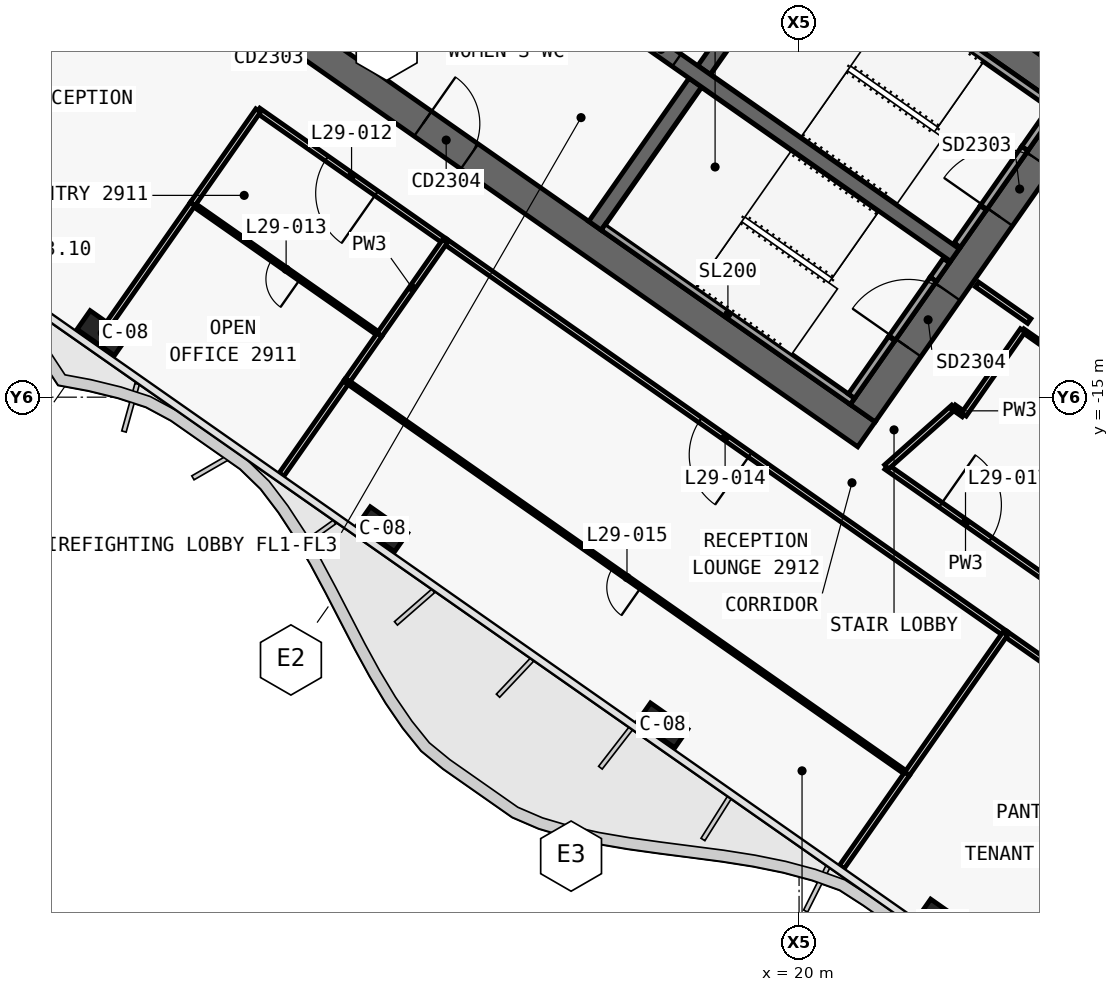
"""IFC4 building model, lengths in metres.
Left out: names, types, materials, properties, quantities, classifications, styles, units other than length and angle.
Written with IfcOpenShell. Run it as: python <this file> out.ifc"""

import sys

from ifc_helpers import new_model, si_unit, direction, frame, frame_2d, origin, origin_2d, place, context, subcontext, project, spatial, polyline, rectangle, outline, extrude, element, fill, save


model = new_model("IFC4")
c1 = context("Model", 3, precision=1e-05, world=origin(), true_north=direction((0.0, 1.0)))
c2 = subcontext(c1, "Body", "Model", "MODEL_VIEW")
j1 = project(units=[si_unit("LENGTHUNIT", "METRE"), si_unit("PLANEANGLEUNIT", "RADIAN")], contexts=[c1])
p1 = place(None, origin())
s1 = spatial("IfcSite", under=j1, at=p1, CompositionType="ELEMENT")
p2 = place(p1, origin())
s2 = spatial("IfcBuilding", under=s1, at=p2, CompositionType="ELEMENT")
p3 = place(p2, frame((0.0, 0.0, 132.0)))
s3 = spatial("IfcBuildingStorey", under=s2, at=p3, CompositionType="ELEMENT", Elevation=132.0)
p4 = place(p3, frame((-0.029, 11.984, 0.0), z_axis=(0.0, 0.0, 1.0), x_axis=(0.819151382952, -0.573577380837, 0.0)))
e1 = element("IfcWall", 1, at=p4, inside=s3, PredefinedType="SHEAR", context=c2, shape_type="SweptSolid", body=[
    extrude(outline(polyline([(33.898, 0.4), (-0.0, 0.4), (0.56, -0.4), (33.898, -0.4), (33.898, 0.4)])), origin(), (0.0, 0.0, 1.0), 3.9),
])
p5 = place(p3, frame((-0.029, -0.712, 0.0), z_axis=(0.0, 0.0, 1.0), x_axis=(0.819151758019, -0.573576845187, 0.0)))
e2 = element("IfcWall", 2, at=p5, inside=s3, PredefinedType="SHEAR", context=c2, shape_type="SweptSolid", body=[
    extrude(outline(polyline([(26.616, 0.4), (-0.0, 0.4), (0.56, -0.4), (26.616, -0.4), (26.616, 0.4)])), origin(), (0.0, 0.0, 1.0), 3.9),
])
p6 = place(p5, frame((6.666, 0.0, 0.0)))
e3 = element("IfcOpeningElement", 3, at=p6, cuts=e2, PredefinedType="OPENING", context=c2, shape_type="SweptSolid", body=[
    extrude(rectangle(XDim=1.5, YDim=2.1, at=frame_2d((0.75, 1.05))), frame((0.0, 0.41, 0.0), z_axis=(0.0, -1.0, 0.0), x_axis=(1.0, 0.0, 0.0)), (0.0, 0.0, 1.0), 0.82),
])
p7 = place(p5, frame((12.366, 0.0, 0.0)))
e4 = element("IfcOpeningElement", 4, at=p7, cuts=e2, PredefinedType="OPENING", context=c2, shape_type="SweptSolid", body=[
    extrude(rectangle(XDim=1.5, YDim=2.1, at=frame_2d((0.75, 1.05))), frame((0.0, 0.41, 0.0), z_axis=(0.0, -1.0, 0.0), x_axis=(1.0, 0.0, 0.0)), (0.0, 0.0, 1.0), 0.82),
])
p8 = place(p3, frame((21.675, -15.421, 0.0), z_axis=(0.0, 0.0, 1.0), x_axis=(0.573581815061, 0.819148278049, 0.0)))
e5 = element("IfcWall", 5, at=p8, inside=s3, PredefinedType="SHEAR", context=c2, shape_type="SweptSolid", body=[
    extrude(outline(polyline([(9.6, 0.4), (0.0, 0.4), (0.0, -0.4), (9.6, -0.4), (9.6, 0.4)])), origin(), (0.0, 0.0, 1.0), 3.9),
])
p9 = place(p8, frame((6.3, 0.0, 0.0)))
e6 = element("IfcOpeningElement", 6, at=p9, cuts=e5, PredefinedType="OPENING", context=c2, shape_type="SweptSolid", body=[
    extrude(rectangle(XDim=1.8, YDim=2.1, at=frame_2d((0.9, 1.05))), frame((0.0, 0.41, 0.0), z_axis=(0.0, -1.0, 0.0), x_axis=(1.0, 0.0, 0.0)), (0.0, 0.0, 1.0), 0.82),
])
p10 = place(p8, frame((2.1, 0.0, 0.0)))
e7 = element("IfcOpeningElement", 7, at=p10, cuts=e5, PredefinedType="OPENING", context=c2, shape_type="SweptSolid", body=[
    extrude(rectangle(XDim=1.8, YDim=2.1, at=frame_2d((0.9, 1.05))), frame((0.0, 0.41, 0.0), z_axis=(0.0, -1.0, 0.0), x_axis=(1.0, 0.0, 0.0)), (0.0, 0.0, 1.0), 0.82),
])
p11 = place(p3, frame((14.63, -10.488, 0.0), z_axis=(0.0, 0.0, 1.0), x_axis=(0.573611936273, 0.819127185829, 0.0)))
e8 = element("IfcWall", 8, at=p11, inside=s3, PredefinedType="SHEAR", context=c2, shape_type="SweptSolid", body=[
    extrude(outline(polyline([(0.0, 0.2), (0.0, -0.2), (4.6, -0.2), (4.6, 0.2), (0.0, 0.2)])), origin(), (0.0, 0.0, 1.0), 3.9),
])
p12 = place(p3, frame((17.498, -6.392, 0.0), z_axis=(0.0, 0.0, 1.0), x_axis=(0.573611936273, 0.819127185829, 0.0)))
e9 = element("IfcWall", 9, at=p12, inside=s3, PredefinedType="SHEAR", context=c2, shape_type="SweptSolid", body=[
    extrude(outline(polyline([(4.6, -0.2), (4.6, 0.2), (0.0, 0.2), (0.0, -0.2), (4.6, -0.2)])), origin(), (0.0, 0.0, 1.0), 3.9),
])
p13 = place(p3, frame((2.638, 3.768, 0.0), z_axis=(0.0, 0.0, 1.0), x_axis=(0.81915267502, -0.573575535572, 0.0)))
e10 = element("IfcWall", 10, at=p13, inside=s3, PredefinedType="SHEAR", context=c2, shape_type="SweptSolid", body=[
    extrude(outline(polyline([(0.0, 0.2), (0.0, -0.2), (26.2, -0.2), (26.2, 0.2), (0.0, 0.2)])), origin(), (0.0, 0.0, 1.0), 3.9),
])
p14 = place(p13, frame((9.637, 0.0, 0.0)))
e11 = element("IfcOpeningElement", 11, at=p14, cuts=e10, PredefinedType="OPENING", context=c2, shape_type="SweptSolid", body=[
    extrude(rectangle(XDim=1.2, YDim=2.1, at=frame_2d((0.6, 1.05))), frame((0.0, 0.21, 0.0), z_axis=(0.0, -1.0, 0.0), x_axis=(1.0, 0.0, 0.0)), (0.0, 0.0, 1.0), 0.42),
])
p15 = place(p13, frame((11.812, 0.0, 0.0)))
e12 = element("IfcOpeningElement", 12, at=p15, cuts=e10, PredefinedType="OPENING", context=c2, shape_type="SweptSolid", body=[
    extrude(rectangle(XDim=1.2, YDim=2.1, at=frame_2d((0.6, 1.05))), frame((0.0, 0.21, 0.0), z_axis=(0.0, -1.0, 0.0), x_axis=(1.0, 0.0, 0.0)), (0.0, 0.0, 1.0), 0.42),
])
p16 = place(p13, frame((13.988, 0.0, 0.0)))
e13 = element("IfcOpeningElement", 13, at=p16, cuts=e10, PredefinedType="OPENING", context=c2, shape_type="SweptSolid", body=[
    extrude(rectangle(XDim=1.2, YDim=2.1, at=frame_2d((0.6, 1.05))), frame((0.0, 0.21, 0.0), z_axis=(0.0, -1.0, 0.0), x_axis=(1.0, 0.0, 0.0)), (0.0, 0.0, 1.0), 0.42),
])
p17 = place(p13, frame((16.262, 0.0, 0.0)))
e14 = element("IfcOpeningElement", 14, at=p17, cuts=e10, PredefinedType="OPENING", context=c2, shape_type="SweptSolid", body=[
    extrude(rectangle(XDim=1.0, YDim=2.1, at=frame_2d((0.5, 1.05))), frame((0.0, 0.21, 0.0), z_axis=(0.0, -1.0, 0.0), x_axis=(1.0, 0.0, 0.0)), (0.0, 0.0, 1.0), 0.42),
])
for number, where, z_axis, x_axis in (
    (15, (1.665, -13.313, 0.0), (0.0, 0.0, 1.0), (0.819, -0.574, 0.0)),
    (16, (9.038, -18.475, 0.0), (0.0, 0.0, 1.0), (0.819, -0.574, 0.0)),
    (17, (16.41, -23.637, 0.0), (0.0, 0.0, 1.0), (0.819, -0.574, 0.0)),
    (18, (23.782, -28.799, 0.0), (0.0, 0.0, 1.0), (0.819, -0.574, 0.0)),
):
    element("IfcColumn", number, at=place(p3, frame(where, z_axis=z_axis, x_axis=x_axis)), inside=s3, PredefinedType="COLUMN", context=c2, shape_type="SweptSolid", body=[
        extrude(rectangle(XDim=1.2, YDim=0.6, at=origin_2d()), origin(), (0.0, 0.0, 1.0), 3.9),
    ])
p18 = place(p3, frame((20.243, -2.821, 0.0), z_axis=(0.0, 0.0, 1.0), x_axis=(0.819141584393, -0.57359137434, 0.0)))
e19 = element("IfcWall", 19, at=p18, inside=s3, PredefinedType="SOLIDWALL", context=c2, shape_type="SweptSolid", body=[
    extrude(rectangle(XDim=8.0, YDim=0.2, at=frame_2d((4.0, 0.0))), origin(), (0.0, 0.0, 1.0), 3.62),
])
p19 = place(p3, frame((24.162, -10.998, 0.0), z_axis=(0.0, 0.0, 1.0), x_axis=(0.573612502218, 0.819126789514, 0.0)))
e20 = element("IfcWall", 20, at=p19, inside=s3, PredefinedType="SOLIDWALL", context=c2, shape_type="SweptSolid", body=[
    extrude(rectangle(XDim=1.2, YDim=0.2, at=frame_2d((0.6, 0.0))), origin(), (0.0, 0.0, 1.0), 3.62),
])
p20 = place(p3, frame((25.94, -8.458, 0.0), z_axis=(0.0, 0.0, 1.0), x_axis=(0.573619628835, 0.819121798889, 0.0)))
e21 = element("IfcWall", 21, at=p20, inside=s3, PredefinedType="SOLIDWALL", context=c2, shape_type="SweptSolid", body=[
    extrude(rectangle(XDim=1.25, YDim=0.2, at=frame_2d((0.625, 0.0))), origin(), (0.0, 0.0, 1.0), 3.62),
])
p21 = place(p3, frame((24.85, -10.014, 2.15), z_axis=(0.0, 0.0, 1.0), x_axis=(0.573505465124, 0.819201734296, 0.0)))
e22 = element("IfcWall", 22, at=p21, inside=s3, PredefinedType="SOLIDWALL", context=c2, shape_type="SweptSolid", body=[
    extrude(rectangle(XDim=1.9, YDim=0.2, at=frame_2d((0.95, 0.0))), origin(), (0.0, 0.0, 1.0), 1.47),
])
p22 = place(p3, frame((14.851, -10.521, 0.0), z_axis=(0.0, 0.0, 1.0), x_axis=(0.819141584393, -0.57359137434, 0.0)))
e23 = element("IfcWall", 23, at=p22, inside=s3, PredefinedType="SOLIDWALL", context=c2, shape_type="SweptSolid", body=[
    extrude(rectangle(XDim=8.0, YDim=0.2, at=frame_2d((4.0, 0.0))), origin(), (0.0, 0.0, 1.0), 3.62),
])
p23 = place(p3, frame((21.38, -14.97, 0.0), z_axis=(0.0, 0.0, 1.0), x_axis=(0.573559770908, 0.819163713305, 0.0)))
e24 = element("IfcWall", 24, at=p23, inside=s3, PredefinedType="SOLIDWALL", context=c2, shape_type="SweptSolid", body=[
    extrude(rectangle(XDim=1.85, YDim=0.2, at=frame_2d((0.925, 0.0))), origin(), (0.0, 0.0, 1.0), 3.62),
])
p24 = place(p3, frame((23.531, -11.898, 0.0), z_axis=(0.0, 0.0, 1.0), x_axis=(0.573708088123, 0.819059844958, 0.0)))
e25 = element("IfcWall", 25, at=p24, inside=s3, PredefinedType="SOLIDWALL", context=c2, shape_type="SweptSolid", body=[
    extrude(rectangle(XDim=0.6, YDim=0.2, at=frame_2d((0.3, 0.0))), origin(), (0.0, 0.0, 1.0), 3.62),
])
p25 = place(p3, frame((22.441, -13.455, 2.15), z_axis=(0.0, 0.0, 1.0), x_axis=(0.573591692345, 0.819141361715, 0.0)))
e26 = element("IfcWall", 26, at=p25, inside=s3, PredefinedType="SOLIDWALL", context=c2, shape_type="SweptSolid", body=[
    extrude(rectangle(XDim=1.9, YDim=0.2, at=frame_2d((0.95, 0.0))), origin(), (0.0, 0.0, 1.0), 1.47),
])
p26 = place(p3, frame((22.3, -16.835, 0.0), z_axis=(0.0, 0.0, 1.0), x_axis=(0.819173202411, -0.573546218235, 0.0)))
e27 = element("IfcWall", 27, at=p26, inside=s3, PredefinedType="PARTITIONING", context=c2, shape_type="SweptSolid", body=[
    extrude(rectangle(XDim=5.079, YDim=0.15, at=frame_2d((2.54, 0.0))), origin(), (0.0, 0.0, 1.0), 3.0),
])
p27 = place(p26, frame((1.74, 0.0, 0.0)))
e28 = element("IfcOpeningElement", 28, at=p27, cuts=e27, PredefinedType="OPENING", context=c2, shape_type="SweptSolid", body=[
    extrude(rectangle(XDim=1.6, YDim=2.1, at=frame_2d((0.8, 1.05))), frame((0.0, 0.085, 0.0), z_axis=(0.0, -1.0, 0.0), x_axis=(1.0, 0.0, 0.0)), (0.0, 0.0, 1.0), 0.17),
])
p28 = place(p3, frame((10.683, -10.898, 0.0), z_axis=(0.0, 0.0, 1.0), x_axis=(-0.819180321071, 0.573536050802, 0.0)))
e29 = element("IfcWall", 29, at=p28, inside=s3, PredefinedType="PARTITIONING", context=c2, shape_type="SweptSolid", body=[
    extrude(rectangle(XDim=6.002, YDim=0.15, at=frame_2d((3.001, 0.0))), origin(), (0.0, 0.0, 1.0), 3.0),
])
p29 = place(p28, frame((2.201, 0.0, 0.0)))
e30 = element("IfcOpeningElement", 30, at=p29, cuts=e29, PredefinedType="OPENING", context=c2, shape_type="SweptSolid", body=[
    extrude(rectangle(XDim=1.6, YDim=2.1, at=frame_2d((0.8, 1.05))), frame((0.0, 0.085, 0.0), z_axis=(0.0, -1.0, 0.0), x_axis=(1.0, 0.0, 0.0)), (0.0, 0.0, 1.0), 0.17),
])
p30 = place(p3, frame((25.428, -21.222, 0.0), z_axis=(0.0, 0.0, 1.0), x_axis=(-0.819170120389, 0.573550620139, 0.0)))
e31 = element("IfcWall", 31, at=p30, inside=s3, PredefinedType="PARTITIONING", context=c2, shape_type="SweptSolid", body=[
    extrude(rectangle(XDim=18.004, YDim=0.15, at=frame_2d((9.002, 0.0))), origin(), (0.0, 0.0, 1.0), 3.0),
])
p31 = place(p30, frame((8.202, 0.0, 0.0)))
e32 = element("IfcOpeningElement", 32, at=p31, cuts=e31, PredefinedType="OPENING", context=c2, shape_type="SweptSolid", body=[
    extrude(rectangle(XDim=1.6, YDim=2.1, at=frame_2d((0.8, 1.05))), frame((0.0, 0.085, 0.0), z_axis=(0.0, -1.0, 0.0), x_axis=(1.0, 0.0, 0.0)), (0.0, 0.0, 1.0), 0.17),
])
p32 = place(p3, frame((35.256, -28.104, 0.0), z_axis=(0.0, 0.0, 1.0), x_axis=(-0.819174576401, 0.573544255814, 0.0)))
e33 = element("IfcWall", 33, at=p32, inside=s3, PredefinedType="PARTITIONING", context=c2, shape_type="SweptSolid", body=[
    extrude(rectangle(XDim=12.002, YDim=0.15, at=frame_2d((6.001, 0.0))), origin(), (0.0, 0.0, 1.0), 2.9),
])
p33 = place(p32, frame((5.201, 0.0, 0.0)))
e34 = element("IfcOpeningElement", 34, at=p33, cuts=e33, PredefinedType="OPENING", context=c2, shape_type="SweptSolid", body=[
    extrude(rectangle(XDim=1.6, YDim=2.1, at=frame_2d((0.8, 1.05))), frame((0.0, 0.085, 0.0), z_axis=(0.0, -1.0, 0.0), x_axis=(1.0, 0.0, 0.0)), (0.0, 0.0, 1.0), 0.17),
])
p34 = place(p3, frame((25.886, -13.242, 0.0), z_axis=(0.0, 0.0, 1.0), x_axis=(0.819160910421, -0.573563773994, 0.0)))
e35 = element("IfcWall", 35, at=p34, inside=s3, PredefinedType="PARTITIONING", context=c2, shape_type="SweptSolid", body=[
    extrude(rectangle(XDim=4.2, YDim=0.1, at=frame_2d((2.1, 0.0))), origin(), (0.0, 0.0, 1.0), 3.62),
])
p35 = place(p34, frame((1.65, 0.0, 0.0)))
e36 = element("IfcOpeningElement", 36, at=p35, cuts=e35, PredefinedType="OPENING", context=c2, shape_type="SweptSolid", body=[
    extrude(rectangle(XDim=0.9, YDim=2.1, at=frame_2d((0.45, 1.05))), frame((0.0, 0.06, 0.0), z_axis=(0.0, -1.0, 0.0), x_axis=(1.0, 0.0, 0.0)), (0.0, 0.0, 1.0), 0.12),
])
p36 = place(p3, frame((26.058, -12.997, 0.0), z_axis=(0.0, 0.0, 1.0), x_axis=(-0.819109000826, 0.573637903879, 0.0)))
e37 = element("IfcWall", 37, at=p36, inside=s3, PredefinedType="PARTITIONING", context=c2, shape_type="SweptSolid", body=[
    extrude(rectangle(XDim=1.68, YDim=0.15, at=frame_2d((0.84, 0.0))), origin(), (0.0, 0.0, 1.0), 3.62),
])
p37 = place(p3, frame((22.301, -16.836, 0.0), z_axis=(0.0, 0.0, 1.0), x_axis=(0.746924703007, 0.664908631345, 0.0)))
e38 = element("IfcWall", 38, at=p37, inside=s3, PredefinedType="PARTITIONING", context=c2, shape_type="SweptSolid", body=[
    extrude(rectangle(XDim=2.364, YDim=0.15, at=frame_2d((1.182, 0.0))), origin(), (0.0, 0.0, 1.0), 3.0),
])
p38 = place(p3, frame((24.067, -15.265, 0.0), z_axis=(0.0, 0.0, 1.0), x_axis=(0.819092976344, -0.573660784876, 0.0)))
e39 = element("IfcWall", 39, at=p38, inside=s3, PredefinedType="PARTITIONING", context=c2, shape_type="SweptSolid", body=[
    extrude(rectangle(XDim=0.33, YDim=0.15, at=frame_2d((0.165, 0.0))), origin(), (0.0, 0.0, 1.0), 3.62),
])
p39 = place(p3, frame((24.337, -15.454, 0.0), z_axis=(0.0, 0.0, 1.0), x_axis=(0.573626181702, 0.819117209968, 0.0)))
e40 = element("IfcWall", 40, at=p39, inside=s3, PredefinedType="PARTITIONING", context=c2, shape_type="SweptSolid", body=[
    extrude(rectangle(XDim=2.7, YDim=0.15, at=frame_2d((1.35, 0.0))), origin(), (0.0, 0.0, 1.0), 3.62),
])
p40 = place(p3, frame((8.96, -13.355, 0.0), z_axis=(0.0, 0.0, 1.0), x_axis=(-0.819149710902, 0.573579768758, 0.0)))
e41 = element("IfcWall", 41, at=p40, inside=s3, PredefinedType="PARTITIONING", context=c2, shape_type="SweptSolid", body=[
    extrude(rectangle(XDim=6.0, YDim=0.1, at=frame_2d((3.0, 0.0))), origin(), (0.0, 0.0, 1.0), 3.0),
])
p41 = place(p40, frame((2.55, 0.0, 0.0)))
e42 = element("IfcOpeningElement", 42, at=p41, cuts=e41, PredefinedType="OPENING", context=c2, shape_type="SweptSolid", body=[
    extrude(rectangle(XDim=0.9, YDim=2.1, at=frame_2d((0.45, 1.05))), frame((0.0, 0.06, 0.0), z_axis=(0.0, -1.0, 0.0), x_axis=(1.0, 0.0, 0.0)), (0.0, 0.0, 1.0), 0.12),
])
p42 = place(p3, frame((8.101, -14.583, 0.0), z_axis=(0.0, 0.0, 1.0), x_axis=(-0.573516940352, -0.819193700616, 0.0)))
e43 = element("IfcWall", 43, at=p42, inside=s3, PredefinedType="PARTITIONING", context=c2, shape_type="SweptSolid", body=[
    extrude(rectangle(XDim=3.001, YDim=0.15, at=frame_2d((1.5, 0.0))), origin(), (0.0, 0.0, 1.0), 2.9),
])
p43 = place(p3, frame((8.96, -13.355, 0.0), z_axis=(0.0, 0.0, 1.0), x_axis=(-0.573473259837, -0.819224279579, 0.0)))
e44 = element("IfcWall", 44, at=p43, inside=s3, PredefinedType="PARTITIONING", context=c2, shape_type="SweptSolid", body=[
    extrude(rectangle(XDim=1.501, YDim=0.15, at=frame_2d((0.75, 0.0))), origin(), (0.0, 0.0, 1.0), 3.62),
])
p44 = place(p3, frame((1.849, -13.051, 0.0), z_axis=(0.0, 0.0, 1.0), x_axis=(0.573594994199, 0.819139049631, 0.0)))
e45 = element("IfcWall", 45, at=p44, inside=s3, PredefinedType="PARTITIONING", context=c2, shape_type="SweptSolid", body=[
    extrude(rectangle(XDim=3.829, YDim=0.15, at=frame_2d((1.915, 0.0))), origin(), (0.0, 0.0, 1.0), 3.0),
])
p45 = place(p3, frame((10.681, -10.897, 0.0), z_axis=(0.0, 0.0, 1.0), x_axis=(-0.573615254604, -0.819124862085, 0.0)))
e46 = element("IfcWall", 46, at=p45, inside=s3, PredefinedType="PARTITIONING", context=c2, shape_type="SweptSolid", body=[
    extrude(rectangle(XDim=3.0, YDim=0.15, at=frame_2d((1.5, 0.0))), origin(), (0.0, 0.0, 1.0), 3.62),
])
p46 = place(p3, frame((4.046, -9.913, 0.0), z_axis=(0.0, 0.0, 1.0), x_axis=(0.573560650686, 0.819163097304, 0.0)))
e47 = element("IfcWall", 47, at=p46, inside=s3, PredefinedType="PARTITIONING", context=c2, shape_type="SweptSolid", body=[
    extrude(rectangle(XDim=3.0, YDim=0.15, at=frame_2d((1.5, 0.0))), origin(), (0.0, 0.0, 1.0), 3.0),
])
p47 = place(p3, frame((22.844, -24.909, 0.0), z_axis=(0.0, 0.0, 1.0), x_axis=(-0.81914780044, 0.573582497149, 0.0)))
e48 = element("IfcWall", 48, at=p47, inside=s3, PredefinedType="PARTITIONING", context=c2, shape_type="SweptSolid", body=[
    extrude(rectangle(XDim=18.0, YDim=0.1, at=frame_2d((9.0, 0.0))), origin(), (0.0, 0.0, 1.0), 3.0),
])
p48 = place(p47, frame((8.55, 0.0, 0.0)))
e49 = element("IfcOpeningElement", 49, at=p48, cuts=e48, PredefinedType="OPENING", context=c2, shape_type="SweptSolid", body=[
    extrude(rectangle(XDim=0.9, YDim=2.1, at=frame_2d((0.45, 1.05))), frame((0.0, 0.06, 0.0), z_axis=(0.0, -1.0, 0.0), x_axis=(1.0, 0.0, 0.0)), (0.0, 0.0, 1.0), 0.12),
])
p49 = place(p3, frame((22.844, -24.909, 0.0), z_axis=(0.0, 0.0, 1.0), x_axis=(-0.573549763719, -0.81917072002, 0.0)))
e50 = element("IfcWall", 50, at=p49, inside=s3, PredefinedType="PARTITIONING", context=c2, shape_type="SweptSolid", body=[
    extrude(rectangle(XDim=2.999, YDim=0.15, at=frame_2d((1.5, 0.0))), origin(), (0.0, 0.0, 1.0), 2.9),
])
p50 = place(p3, frame((25.426, -21.222, 0.0), z_axis=(0.0, 0.0, 1.0), x_axis=(-0.573586141663, -0.819145248471, 0.0)))
e51 = element("IfcWall", 51, at=p50, inside=s3, PredefinedType="PARTITIONING", context=c2, shape_type="SweptSolid", body=[
    extrude(rectangle(XDim=4.5, YDim=0.15, at=frame_2d((2.25, 0.0))), origin(), (0.0, 0.0, 1.0), 3.62),
])
p51 = place(p17, origin())
e52 = element("IfcDoor", 52, at=p51, inside=s3, OperationType="SINGLE_SWING_RIGHT", PredefinedType="DOOR", context=c2, shape_type="SweptSolid", body=[
    extrude(rectangle(XDim=1.0, YDim=2.1, at=frame_2d((0.5, 1.05))), frame((0.0, 0.025, 0.0), z_axis=(0.0, -1.0, 0.0), x_axis=(1.0, 0.0, 0.0)), (0.0, 0.0, 1.0), 0.05),
])
fill(e14, e52)
p52 = place(p7, origin())
e53 = element("IfcDoor", 53, at=p52, inside=s3, OperationType="DOUBLE_DOOR_SINGLE_SWING", PredefinedType="DOOR", context=c2, shape_type="SweptSolid", body=[
    extrude(rectangle(XDim=1.5, YDim=2.1, at=frame_2d((0.75, 1.05))), frame((0.0, 0.025, 0.0), z_axis=(0.0, -1.0, 0.0), x_axis=(1.0, 0.0, 0.0)), (0.0, 0.0, 1.0), 0.05),
])
fill(e4, e53)
p53 = place(p9, origin())
e54 = element("IfcDoor", 54, at=p53, inside=s3, OperationType="DOUBLE_DOOR_SINGLE_SWING", PredefinedType="DOOR", context=c2, shape_type="SweptSolid", body=[
    extrude(rectangle(XDim=1.8, YDim=2.1, at=frame_2d((0.9, 1.05))), frame((0.0, 0.025, 0.0), z_axis=(0.0, -1.0, 0.0), x_axis=(1.0, 0.0, 0.0)), (0.0, 0.0, 1.0), 0.05),
])
fill(e6, e54)
p54 = place(p10, origin())
e55 = element("IfcDoor", 55, at=p54, inside=s3, OperationType="DOUBLE_DOOR_SINGLE_SWING", PredefinedType="DOOR", context=c2, shape_type="SweptSolid", body=[
    extrude(rectangle(XDim=1.8, YDim=2.1, at=frame_2d((0.9, 1.05))), frame((0.0, 0.025, 0.0), z_axis=(0.0, -1.0, 0.0), x_axis=(1.0, 0.0, 0.0)), (0.0, 0.0, 1.0), 0.05),
])
fill(e7, e55)
p55 = place(p29, origin())
e56 = element("IfcDoor", 56, at=p55, inside=s3, OperationType="DOUBLE_DOOR_SINGLE_SWING", PredefinedType="DOOR", context=c2, shape_type="SweptSolid", body=[
    extrude(rectangle(XDim=1.6, YDim=2.1, at=frame_2d((0.8, 1.05))), frame((0.0, 0.025, 0.0), z_axis=(0.0, -1.0, 0.0), x_axis=(1.0, 0.0, 0.0)), (0.0, 0.0, 1.0), 0.05),
])
fill(e30, e56)
p56 = place(p41, origin())
e57 = element("IfcDoor", 57, at=p56, inside=s3, OperationType="SINGLE_SWING_LEFT", PredefinedType="DOOR", context=c2, shape_type="SweptSolid", body=[
    extrude(rectangle(XDim=0.9, YDim=2.1, at=frame_2d((0.45, 1.05))), frame((0.0, 0.025, 0.0), z_axis=(0.0, -1.0, 0.0), x_axis=(1.0, 0.0, 0.0)), (0.0, 0.0, 1.0), 0.05),
])
fill(e42, e57)
p57 = place(p31, origin())
e58 = element("IfcDoor", 58, at=p57, inside=s3, OperationType="DOUBLE_DOOR_SINGLE_SWING", PredefinedType="DOOR", context=c2, shape_type="SweptSolid", body=[
    extrude(rectangle(XDim=1.6, YDim=2.1, at=frame_2d((0.8, 1.05))), frame((0.0, 0.025, 0.0), z_axis=(0.0, -1.0, 0.0), x_axis=(1.0, 0.0, 0.0)), (0.0, 0.0, 1.0), 0.05),
])
fill(e32, e58)
p58 = place(p48, origin())
e59 = element("IfcDoor", 59, at=p58, inside=s3, OperationType="SINGLE_SWING_LEFT", PredefinedType="DOOR", context=c2, shape_type="SweptSolid", body=[
    extrude(rectangle(XDim=0.9, YDim=2.1, at=frame_2d((0.45, 1.05))), frame((0.0, 0.025, 0.0), z_axis=(0.0, -1.0, 0.0), x_axis=(1.0, 0.0, 0.0)), (0.0, 0.0, 1.0), 0.05),
])
fill(e49, e59)
p59 = place(p27, origin())
e60 = element("IfcDoor", 60, at=p59, inside=s3, OperationType="DOUBLE_DOOR_SINGLE_SWING", PredefinedType="DOOR", context=c2, shape_type="SweptSolid", body=[
    extrude(rectangle(XDim=1.6, YDim=2.1, at=frame_2d((0.8, 1.05))), frame((0.0, 0.025, 0.0), z_axis=(0.0, -1.0, 0.0), x_axis=(1.0, 0.0, 0.0)), (0.0, 0.0, 1.0), 0.05),
])
fill(e28, e60)
save(model, sys.argv[1])
